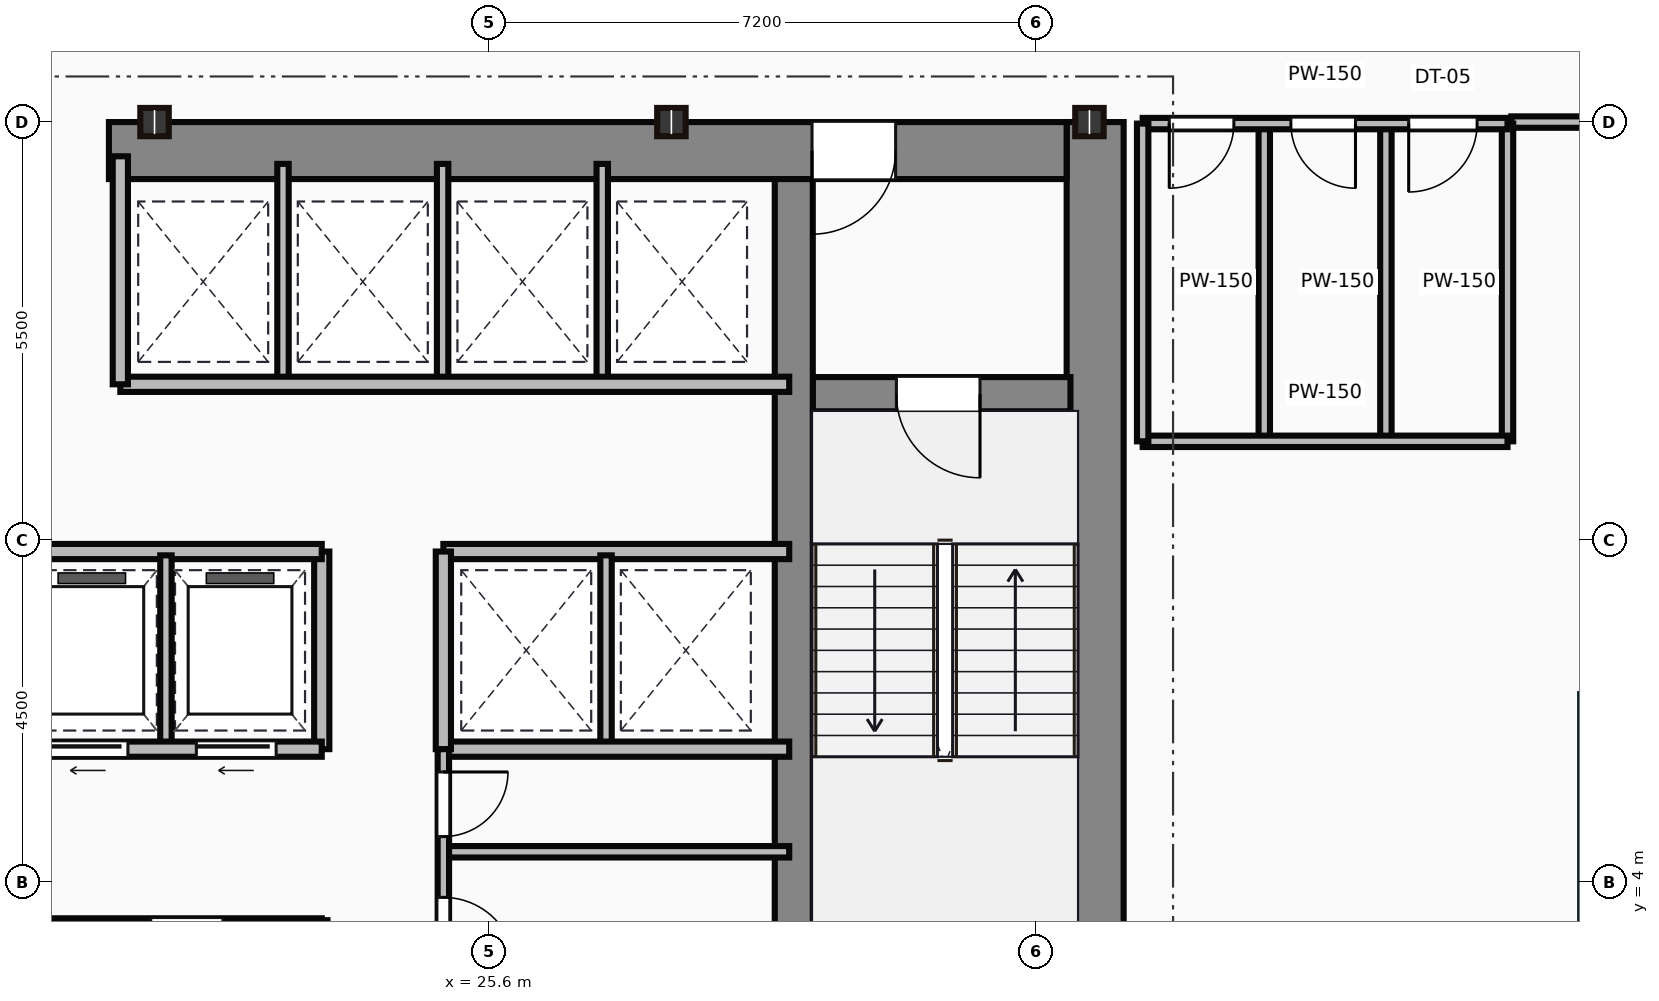
"""IFC4 building model, lengths in metres.
Left out: names, types, materials, properties, quantities, classifications, styles, units other than length and angle.
Written with IfcOpenShell. Run it as: python <this file> out.ifc"""

import sys

from ifc_helpers import new_model, si_unit, direction, frame, frame_2d, origin, origin_2d, place, context, subcontext, project, spatial, rectangle, i_section, extrude, source, transform, mapped, element, fill, save


model = new_model("IFC4")
c1 = context("Model", 3, precision=1e-05, world=origin(), true_north=direction((0.0, 1.0)))
c2 = subcontext(c1, "Body", "Model", "MODEL_VIEW")
j1 = project(units=[si_unit("LENGTHUNIT", "METRE"), si_unit("PLANEANGLEUNIT", "RADIAN")], contexts=[c1])
p1 = place(None, origin())
s1 = spatial("IfcSite", under=j1, at=p1, CompositionType="ELEMENT")
p2 = place(p1, origin())
s2 = spatial("IfcBuilding", under=s1, at=p2, CompositionType="ELEMENT")
p3 = place(p2, frame((0.0, 0.0, 155.2)))
s3 = spatial("IfcBuildingStorey", under=s2, at=p3, CompositionType="ELEMENT", Elevation=155.2)
m1 = source(origin(), c2, "Body", "SweptSolid", [
    extrude(rectangle(XDim=13.1, YDim=0.75, at=frame_2d((6.55, 0.0))), origin(), (0.0, 0.0, 1.0), 3.65),
])
p4 = place(p3, frame((33.575, 0.9, 0.0), z_axis=(0.0, 0.0, 1.0), x_axis=(0.0, 1.0, 0.0)))
e1 = element("IfcWall", 1, at=p4, inside=s3, PredefinedType="SHEAR", context=c2, shape_type="MappedRepresentation", body=[
    mapped(m1, transform((0.0, 0.0, 0.0))),
])
m2 = source(origin(), c2, "Body", "SweptSolid", [
    extrude(rectangle(XDim=12.6, YDim=0.75, at=frame_2d((6.3, 0.0))), origin(), (0.0, 0.0, 1.0), 3.65),
])
p5 = place(p3, frame((20.6, 13.625, 0.0), z_axis=(0.0, 0.0, 1.0), x_axis=(1.0, 0.0, 0.0)))
e2 = element("IfcWall", 2, at=p5, inside=s3, PredefinedType="SHEAR", context=c2, shape_type="MappedRepresentation", body=[
    mapped(m2, transform((0.0, 0.0, 0.0))),
])
p6 = place(p5, frame((9.25, 0.0, 0.0)))
e3 = element("IfcOpeningElement", 3, at=p6, cuts=e2, PredefinedType="OPENING", context=c2, shape_type="SweptSolid", body=[
    extrude(rectangle(XDim=1.1, YDim=2.15, at=frame_2d((0.55, 1.075))), frame((0.0, 0.385, 0.0), z_axis=(0.0, -1.0, 0.0), x_axis=(1.0, 0.0, 0.0)), (0.0, 0.0, 1.0), 0.77),
])
m3 = source(origin(), c2, "Body", "SweptSolid", [
    extrude(rectangle(XDim=12.35, YDim=0.5, at=frame_2d((6.175, 0.0))), origin(), (0.0, 0.0, 1.0), 3.65),
])
p7 = place(p3, frame((29.61, 0.9, 0.0), z_axis=(0.0, 0.0, 1.0), x_axis=(0.0, 1.0, 0.0)))
e4 = element("IfcWall", 4, at=p7, inside=s3, PredefinedType="SHEAR", context=c2, shape_type="MappedRepresentation", body=[
    mapped(m3, transform((0.0, 0.0, 0.0))),
])
m4 = source(origin(), c2, "Body", "SweptSolid", [
    extrude(rectangle(XDim=3.39, YDim=0.45, at=frame_2d((1.695, 0.0))), origin(), (0.0, 0.0, 1.0), 3.65),
])
p8 = place(p3, frame((29.86, 10.42, 0.0), z_axis=(0.0, 0.0, 1.0), x_axis=(1.0, 0.0, 0.0)))
e5 = element("IfcWall", 5, at=p8, inside=s3, PredefinedType="SHEAR", context=c2, shape_type="MappedRepresentation", body=[
    mapped(m4, transform((0.0, 0.0, 0.0))),
])
p9 = place(p8, frame((1.1, 0.0, 0.0)))
e6 = element("IfcOpeningElement", 6, at=p9, cuts=e5, PredefinedType="OPENING", context=c2, shape_type="SweptSolid", body=[
    extrude(rectangle(XDim=1.1, YDim=2.15, at=frame_2d((0.55, 1.075))), frame((0.0, 0.235, 0.0), z_axis=(0.0, -1.0, 0.0), x_axis=(1.0, 0.0, 0.0)), (0.0, 0.0, 1.0), 0.47),
])
m5 = source(origin(), c2, "Body", "SweptSolid", [
    extrude(i_section(OverallWidth=0.374, OverallDepth=0.372, WebThickness=0.016, FlangeThickness=0.026, at=origin_2d()), origin(), (0.0, 0.0, 1.0), 3.65),
])
for number, where, z_axis, x_axis in (
    (7, (21.2, 14.0, 0.0), (0.0, 0.0, 1.0), (1.0, 0.0, 0.0)),
    (8, (28.0, 14.0, 0.0), (0.0, 0.0, 1.0), (1.0, 0.0, 0.0)),
    (9, (33.5, 14.0, 0.0), (0.0, 0.0, 1.0), (1.0, 0.0, 0.0)),
):
    element("IfcColumn", number, at=place(p3, frame(where, z_axis=z_axis, x_axis=x_axis)), inside=s3, PredefinedType="COLUMN", context=c2, shape_type="MappedRepresentation", body=[
        mapped(m5, transform((0.0, 0.0, 0.0))),
    ])
m6 = source(origin(), c2, "Body", "SweptSolid", [
    extrude(rectangle(XDim=10.35, YDim=0.15, at=frame_2d((5.175, 0.0))), origin(), (0.0, 0.0, 1.0), 3.4),
])
p10 = place(p3, frame((13.05, 3.45, 0.0), z_axis=(0.0, 0.0, 1.0), x_axis=(1.0, 0.0, 0.0)))
e10 = element("IfcWall", 10, at=p10, inside=s3, PredefinedType="PARTITIONING", context=c2, shape_type="MappedRepresentation", body=[
    mapped(m6, transform((0.0, 0.0, 0.0))),
])
p11 = place(p10, frame((3.8, 0.0, 0.0)))
e11 = element("IfcOpeningElement", 11, at=p11, cuts=e10, PredefinedType="OPENING", context=c2, shape_type="SweptSolid", body=[
    extrude(rectangle(XDim=0.95, YDim=2.15, at=frame_2d((0.475, 1.075))), frame((0.0, 0.085, 0.0), z_axis=(0.0, -1.0, 0.0), x_axis=(1.0, 0.0, 0.0)), (0.0, 0.0, 1.0), 0.17),
])
p12 = place(p10, frame((8.1, 0.0, 0.0)))
e12 = element("IfcOpeningElement", 12, at=p12, cuts=e10, PredefinedType="OPENING", context=c2, shape_type="SweptSolid", body=[
    extrude(rectangle(XDim=0.95, YDim=2.15, at=frame_2d((0.475, 1.075))), frame((0.0, 0.085, 0.0), z_axis=(0.0, -1.0, 0.0), x_axis=(1.0, 0.0, 0.0)), (0.0, 0.0, 1.0), 0.17),
])
m7 = source(origin(), c2, "Body", "SweptSolid", [
    extrude(rectangle(XDim=2.65, YDim=0.15, at=frame_2d((1.325, 0.0))), origin(), (0.0, 0.0, 1.0), 3.4),
])
p13 = place(p3, frame((23.4, 0.85, 0.0), z_axis=(0.0, 0.0, 1.0), x_axis=(0.0, 1.0, 0.0)))
e13 = element("IfcWall", 13, at=p13, inside=s3, PredefinedType="PARTITIONING", context=c2, shape_type="MappedRepresentation", body=[
    mapped(m7, transform((0.0, 0.0, 0.0))),
])
m8 = source(origin(), c2, "Body", "SweptSolid", [
    extrude(rectangle(XDim=11.85, YDim=0.2, at=frame_2d((5.925, 0.0))), origin(), (0.0, 0.0, 1.0), 3.4),
])
p14 = place(p3, frame((11.55, 5.75, 0.0), z_axis=(0.0, 0.0, 1.0), x_axis=(1.0, 0.0, 0.0)))
e14 = element("IfcWall", 14, at=p14, inside=s3, PredefinedType="PARTITIONING", context=c2, shape_type="MappedRepresentation", body=[
    mapped(m8, transform((0.0, 0.0, 0.0))),
])
p15 = place(p14, frame((0.45, 0.0, 0.0)))
e15 = element("IfcOpeningElement", 15, at=p15, cuts=e14, PredefinedType="OPENING", context=c2, shape_type="SweptSolid", body=[
    extrude(rectangle(XDim=1.05, YDim=2.15, at=frame_2d((0.525, 1.075))), frame((0.0, 0.11, 0.0), z_axis=(0.0, -1.0, 0.0), x_axis=(1.0, 0.0, 0.0)), (0.0, 0.0, 1.0), 0.22),
])
p16 = place(p14, frame((2.4, 0.0, 0.0)))
e16 = element("IfcOpeningElement", 16, at=p16, cuts=e14, PredefinedType="OPENING", context=c2, shape_type="SweptSolid", body=[
    extrude(rectangle(XDim=1.05, YDim=2.15, at=frame_2d((0.525, 1.075))), frame((0.0, 0.11, 0.0), z_axis=(0.0, -1.0, 0.0), x_axis=(1.0, 0.0, 0.0)), (0.0, 0.0, 1.0), 0.22),
])
p17 = place(p14, frame((4.35, 0.0, 0.0)))
e17 = element("IfcOpeningElement", 17, at=p17, cuts=e14, PredefinedType="OPENING", context=c2, shape_type="SweptSolid", body=[
    extrude(rectangle(XDim=1.05, YDim=2.15, at=frame_2d((0.525, 1.075))), frame((0.0, 0.11, 0.0), z_axis=(0.0, -1.0, 0.0), x_axis=(1.0, 0.0, 0.0)), (0.0, 0.0, 1.0), 0.22),
])
p18 = place(p14, frame((6.3, 0.0, 0.0)))
e18 = element("IfcOpeningElement", 18, at=p18, cuts=e14, PredefinedType="OPENING", context=c2, shape_type="SweptSolid", body=[
    extrude(rectangle(XDim=1.05, YDim=2.15, at=frame_2d((0.525, 1.075))), frame((0.0, 0.11, 0.0), z_axis=(0.0, -1.0, 0.0), x_axis=(1.0, 0.0, 0.0)), (0.0, 0.0, 1.0), 0.22),
])
p19 = place(p14, frame((8.25, 0.0, 0.0)))
e19 = element("IfcOpeningElement", 19, at=p19, cuts=e14, PredefinedType="OPENING", context=c2, shape_type="SweptSolid", body=[
    extrude(rectangle(XDim=1.05, YDim=2.15, at=frame_2d((0.525, 1.075))), frame((0.0, 0.11, 0.0), z_axis=(0.0, -1.0, 0.0), x_axis=(1.0, 0.0, 0.0)), (0.0, 0.0, 1.0), 0.22),
])
p20 = place(p14, frame((10.2, 0.0, 0.0)))
e20 = element("IfcOpeningElement", 20, at=p20, cuts=e14, PredefinedType="OPENING", context=c2, shape_type="SweptSolid", body=[
    extrude(rectangle(XDim=1.05, YDim=2.15, at=frame_2d((0.525, 1.075))), frame((0.0, 0.11, 0.0), z_axis=(0.0, -1.0, 0.0), x_axis=(1.0, 0.0, 0.0)), (0.0, 0.0, 1.0), 0.22),
])
p21 = place(p3, frame((11.55, 8.35, 0.0), z_axis=(0.0, 0.0, 1.0), x_axis=(1.0, 0.0, 0.0)))
e21 = element("IfcWall", 21, at=p21, inside=s3, PredefinedType="PARTITIONING", context=c2, shape_type="MappedRepresentation", body=[
    mapped(m8, transform((0.0, 0.0, 0.0))),
])
m9 = source(origin(), c2, "Body", "SweptSolid", [
    extrude(rectangle(XDim=2.6, YDim=0.2, at=frame_2d((1.3, 0.0))), origin(), (0.0, 0.0, 1.0), 3.4),
])
p22 = place(p3, frame((23.4, 5.75, 0.0), z_axis=(0.0, 0.0, 1.0), x_axis=(0.0, 1.0, 0.0)))
e22 = element("IfcWall", 22, at=p22, inside=s3, PredefinedType="PARTITIONING", context=c2, shape_type="MappedRepresentation", body=[
    mapped(m9, transform((0.0, 0.0, 0.0))),
])
m10 = source(origin(), c2, "Body", "SweptSolid", [
    extrude(rectangle(XDim=2.5, YDim=0.15, at=frame_2d((1.25, 0.0))), origin(), (0.0, 0.0, 1.0), 3.4),
])
p23 = place(p3, frame((21.35, 5.8, 0.0), z_axis=(0.0, 0.0, 1.0), x_axis=(0.0, 1.0, 0.0)))
e23 = element("IfcWall", 23, at=p23, inside=s3, PredefinedType="PARTITIONING", context=c2, shape_type="MappedRepresentation", body=[
    mapped(m10, transform((0.0, 0.0, 0.0))),
])
m11 = source(origin(), c2, "Body", "SweptSolid", [
    extrude(rectangle(XDim=8.8, YDim=0.2, at=frame_2d((4.4, 0.0))), origin(), (0.0, 0.0, 1.0), 3.4),
])
p24 = place(p3, frame((20.75, 10.55, 0.0), z_axis=(0.0, 0.0, 1.0), x_axis=(1.0, 0.0, 0.0)))
e24 = element("IfcWall", 24, at=p24, inside=s3, PredefinedType="PARTITIONING", context=c2, shape_type="MappedRepresentation", body=[
    mapped(m11, transform((0.0, 0.0, 0.0))),
])
m12 = source(origin(), c2, "Body", "SweptSolid", [
    extrude(rectangle(XDim=3.0, YDim=0.2, at=frame_2d((1.5, 0.0))), origin(), (0.0, 0.0, 1.0), 3.4),
])
p25 = place(p3, frame((20.75, 10.55, 0.0), z_axis=(0.0, 0.0, 1.0), x_axis=(0.0, 1.0, 0.0)))
e25 = element("IfcWall", 25, at=p25, inside=s3, PredefinedType="PARTITIONING", context=c2, shape_type="MappedRepresentation", body=[
    mapped(m12, transform((0.0, 0.0, 0.0))),
])
m13 = source(origin(), c2, "Body", "SweptSolid", [
    extrude(rectangle(XDim=2.85, YDim=0.15, at=frame_2d((1.425, 0.0))), origin(), (0.0, 0.0, 1.0), 3.4),
])
for number, where, z_axis, x_axis in (
    (26, (22.89, 10.6, 0.0), (0.0, 0.0, 1.0), (0.0, 1.0, 0.0)),
    (27, (24.99, 10.6, 0.0), (0.0, 0.0, 1.0), (0.0, 1.0, 0.0)),
    (28, (27.09, 10.6, 0.0), (0.0, 0.0, 1.0), (0.0, 1.0, 0.0)),
):
    element("IfcWall", number, at=place(p3, frame(where, z_axis=z_axis, x_axis=x_axis)), inside=s3, PredefinedType="PARTITIONING", context=c2, shape_type="MappedRepresentation", body=[
        mapped(m13, transform((0.0, 0.0, 0.0))),
    ])
m14 = source(origin(), c2, "Body", "SweptSolid", [
    extrude(rectangle(XDim=4.55, YDim=0.2, at=frame_2d((2.275, 0.0))), origin(), (0.0, 0.0, 1.0), 3.4),
])
for number, where, z_axis, x_axis in (
    (29, (25.0, 8.35, 0.0), (0.0, 0.0, 1.0), (1.0, 0.0, 0.0)),
    (30, (25.0, 5.75, 0.0), (0.0, 0.0, 1.0), (1.0, 0.0, 0.0)),
):
    element("IfcWall", number, at=place(p3, frame(where, z_axis=z_axis, x_axis=x_axis)), inside=s3, PredefinedType="PARTITIONING", context=c2, shape_type="MappedRepresentation", body=[
        mapped(m14, transform((0.0, 0.0, 0.0))),
    ])
p26 = place(p3, frame((25.0, 5.75, 0.0), z_axis=(0.0, 0.0, 1.0), x_axis=(0.0, 1.0, 0.0)))
e31 = element("IfcWall", 31, at=p26, inside=s3, PredefinedType="PARTITIONING", context=c2, shape_type="MappedRepresentation", body=[
    mapped(m9, transform((0.0, 0.0, 0.0))),
])
p27 = place(p3, frame((27.14, 5.8, 0.0), z_axis=(0.0, 0.0, 1.0), x_axis=(0.0, 1.0, 0.0)))
e32 = element("IfcWall", 32, at=p27, inside=s3, PredefinedType="PARTITIONING", context=c2, shape_type="MappedRepresentation", body=[
    mapped(m10, transform((0.0, 0.0, 0.0))),
])
m15 = source(origin(), c2, "Body", "SweptSolid", [
    extrude(rectangle(XDim=4.9, YDim=0.15, at=frame_2d((2.45, 0.0))), origin(), (0.0, 0.0, 1.0), 3.4),
])
p28 = place(p3, frame((25.0, 0.85, 0.0), z_axis=(0.0, 0.0, 1.0), x_axis=(0.0, 1.0, 0.0)))
e33 = element("IfcWall", 33, at=p28, inside=s3, PredefinedType="PARTITIONING", context=c2, shape_type="MappedRepresentation", body=[
    mapped(m15, transform((0.0, 0.0, 0.0))),
])
p29 = place(p28, frame((2.0, 0.0, 0.0)))
e34 = element("IfcOpeningElement", 34, at=p29, cuts=e33, PredefinedType="OPENING", context=c2, shape_type="SweptSolid", body=[
    extrude(rectangle(XDim=0.95, YDim=2.15, at=frame_2d((0.475, 1.075))), frame((0.0, 0.085, 0.0), z_axis=(0.0, -1.0, 0.0), x_axis=(1.0, 0.0, 0.0)), (0.0, 0.0, 1.0), 0.17),
])
p30 = place(p28, frame((3.75, 0.0, 0.0)))
e35 = element("IfcOpeningElement", 35, at=p30, cuts=e33, PredefinedType="OPENING", context=c2, shape_type="SweptSolid", body=[
    extrude(rectangle(XDim=0.85, YDim=2.15, at=frame_2d((0.425, 1.075))), frame((0.0, 0.085, 0.0), z_axis=(0.0, -1.0, 0.0), x_axis=(1.0, 0.0, 0.0)), (0.0, 0.0, 1.0), 0.17),
])
m16 = source(origin(), c2, "Body", "SweptSolid", [
    extrude(rectangle(XDim=4.55, YDim=0.15, at=frame_2d((2.275, 0.0))), origin(), (0.0, 0.0, 1.0), 3.4),
])
p31 = place(p3, frame((25.0, 4.4, 0.0), z_axis=(0.0, 0.0, 1.0), x_axis=(1.0, 0.0, 0.0)))
e36 = element("IfcWall", 36, at=p31, inside=s3, PredefinedType="PARTITIONING", context=c2, shape_type="MappedRepresentation", body=[
    mapped(m16, transform((0.0, 0.0, 0.0))),
])
m17 = source(origin(), c2, "Body", "SweptSolid", [
    extrude(rectangle(XDim=4.8, YDim=0.15, at=frame_2d((2.4, 0.0))), origin(), (0.0, 0.0, 1.0), 2.76),
])
p32 = place(p3, frame((34.2, 13.98, 0.0), z_axis=(0.0, 0.0, 1.0), x_axis=(1.0, 0.0, 0.0)))
e37 = element("IfcWall", 37, at=p32, inside=s3, PredefinedType="PARTITIONING", context=c2, shape_type="MappedRepresentation", body=[
    mapped(m17, transform((0.0, 0.0, 0.0))),
])
p33 = place(p32, frame((0.35, 0.0, 0.0)))
e38 = element("IfcOpeningElement", 38, at=p33, cuts=e37, PredefinedType="OPENING", context=c2, shape_type="SweptSolid", body=[
    extrude(rectangle(XDim=0.85, YDim=2.1, at=frame_2d((0.425, 1.05))), frame((0.0, 0.085, 0.0), z_axis=(0.0, -1.0, 0.0), x_axis=(1.0, 0.0, 0.0)), (0.0, 0.0, 1.0), 0.17),
])
p34 = place(p32, frame((1.95, 0.0, 0.0)))
e39 = element("IfcOpeningElement", 39, at=p34, cuts=e37, PredefinedType="OPENING", context=c2, shape_type="SweptSolid", body=[
    extrude(rectangle(XDim=0.85, YDim=2.1, at=frame_2d((0.425, 1.05))), frame((0.0, 0.085, 0.0), z_axis=(0.0, -1.0, 0.0), x_axis=(1.0, 0.0, 0.0)), (0.0, 0.0, 1.0), 0.17),
])
p35 = place(p32, frame((3.5, 0.0, 0.0)))
e40 = element("IfcOpeningElement", 40, at=p35, cuts=e37, PredefinedType="OPENING", context=c2, shape_type="SweptSolid", body=[
    extrude(rectangle(XDim=0.9, YDim=2.1, at=frame_2d((0.45, 1.05))), frame((0.0, 0.085, 0.0), z_axis=(0.0, -1.0, 0.0), x_axis=(1.0, 0.0, 0.0)), (0.0, 0.0, 1.0), 0.17),
])
m18 = source(origin(), c2, "Body", "SweptSolid", [
    extrude(rectangle(XDim=4.8, YDim=0.15, at=frame_2d((2.4, 0.0))), origin(), (0.0, 0.0, 1.0), 3.4),
])
p36 = place(p3, frame((34.2, 9.8, 0.0), z_axis=(0.0, 0.0, 1.0), x_axis=(1.0, 0.0, 0.0)))
e41 = element("IfcWall", 41, at=p36, inside=s3, PredefinedType="PARTITIONING", context=c2, shape_type="MappedRepresentation", body=[
    mapped(m18, transform((0.0, 0.0, 0.0))),
])
m19 = source(origin(), c2, "Body", "SweptSolid", [
    extrude(rectangle(XDim=4.18, YDim=0.15, at=frame_2d((2.09, 0.0))), origin(), (0.0, 0.0, 1.0), 3.4),
])
for number, where, z_axis, x_axis in (
    (42, (39.0, 9.8, 0.0), (0.0, 0.0, 1.0), (0.0, 1.0, 0.0)),
    (43, (34.2, 9.8, 0.0), (0.0, 0.0, 1.0), (0.0, 1.0, 0.0)),
    (44, (35.8, 9.8, 0.0), (0.0, 0.0, 1.0), (0.0, 1.0, 0.0)),
    (45, (37.4, 9.8, 0.0), (0.0, 0.0, 1.0), (0.0, 1.0, 0.0)),
):
    element("IfcWall", number, at=place(p3, frame(where, z_axis=z_axis, x_axis=x_axis)), inside=s3, PredefinedType="PARTITIONING", context=c2, shape_type="MappedRepresentation", body=[
        mapped(m19, transform((0.0, 0.0, 0.0))),
    ])
m20 = source(origin(), c2, "Body", "SweptSolid", [
    extrude(rectangle(XDim=1.75, YDim=0.15, at=frame_2d((0.875, 0.0))), origin(), (0.0, 0.0, 1.0), 2.76),
])
p37 = place(p3, frame((40.8, 14.0, 0.0), z_axis=(0.0, 0.0, 1.0), x_axis=(-1.0, 0.0, 0.0)))
e46 = element("IfcWall", 46, at=p37, inside=s3, PredefinedType="PARTITIONING", context=c2, shape_type="MappedRepresentation", body=[
    mapped(m20, transform((0.0, 0.0, 0.0))),
])
m21 = source(origin(), c2, "Body", "SweptSolid", [
    extrude(rectangle(XDim=1.1, YDim=2.15, at=frame_2d((0.55, 1.075))), frame((0.0, 0.025, 0.0), z_axis=(0.0, -1.0, 0.0), x_axis=(1.0, 0.0, 0.0)), (0.0, 0.0, 1.0), 0.05),
])
p38 = place(p9, frame((1.1, 0.0, 0.0), z_axis=(0.0, 0.0, 1.0), x_axis=(-1.0, 0.0, 0.0)))
e47 = element("IfcDoor", 47, at=p38, inside=s3, OperationType="SINGLE_SWING_RIGHT", PredefinedType="DOOR", context=c2, shape_type="MappedRepresentation", body=[
    mapped(m21, transform((0.0, 0.0, 0.0))),
])
fill(e6, e47)
p39 = place(p6, origin())
e48 = element("IfcDoor", 48, at=p39, inside=s3, OperationType="SINGLE_SWING_LEFT", PredefinedType="DOOR", context=c2, shape_type="MappedRepresentation", body=[
    mapped(m21, transform((0.0, 0.0, 0.0))),
])
fill(e3, e48)
m22 = source(origin(), c2, "Body", "SweptSolid", [
    extrude(rectangle(XDim=1.05, YDim=2.15, at=frame_2d((0.525, 1.075))), frame((0.0, 0.025, 0.0), z_axis=(0.0, -1.0, 0.0), x_axis=(1.0, 0.0, 0.0)), (0.0, 0.0, 1.0), 0.05),
])
p40 = place(p19, frame((1.05, 0.0, 0.0), z_axis=(0.0, 0.0, 1.0), x_axis=(-1.0, 0.0, 0.0)))
e49 = element("IfcDoor", 49, at=p40, inside=s3, OperationType="SLIDING_TO_LEFT", PredefinedType="DOOR", context=c2, shape_type="MappedRepresentation", body=[
    mapped(m22, transform((0.0, 0.0, 0.0))),
])
fill(e19, e49)
p41 = place(p20, frame((1.05, 0.0, 0.0), z_axis=(0.0, 0.0, 1.0), x_axis=(-1.0, 0.0, 0.0)))
e50 = element("IfcDoor", 50, at=p41, inside=s3, OperationType="SLIDING_TO_LEFT", PredefinedType="DOOR", context=c2, shape_type="MappedRepresentation", body=[
    mapped(m22, transform((0.0, 0.0, 0.0))),
])
fill(e20, e50)
m23 = source(origin(), c2, "Body", "SweptSolid", [
    extrude(rectangle(XDim=0.95, YDim=2.15, at=frame_2d((0.475, 1.075))), frame((0.0, 0.025, 0.0), z_axis=(0.0, -1.0, 0.0), x_axis=(1.0, 0.0, 0.0)), (0.0, 0.0, 1.0), 0.05),
])
p42 = place(p29, origin())
e51 = element("IfcDoor", 51, at=p42, inside=s3, OperationType="SINGLE_SWING_LEFT", PredefinedType="DOOR", context=c2, shape_type="MappedRepresentation", body=[
    mapped(m23, transform((0.0, 0.0, 0.0))),
])
fill(e34, e51)
m24 = source(origin(), c2, "Body", "SweptSolid", [
    extrude(rectangle(XDim=0.85, YDim=2.15, at=frame_2d((0.425, 1.075))), frame((0.0, 0.025, 0.0), z_axis=(0.0, -1.0, 0.0), x_axis=(1.0, 0.0, 0.0)), (0.0, 0.0, 1.0), 0.05),
])
p43 = place(p30, origin())
e52 = element("IfcDoor", 52, at=p43, inside=s3, OperationType="SINGLE_SWING_RIGHT", PredefinedType="DOOR", context=c2, shape_type="MappedRepresentation", body=[
    mapped(m24, transform((0.0, 0.0, 0.0))),
])
fill(e35, e52)
m25 = source(origin(), c2, "Body", "SweptSolid", [
    extrude(rectangle(XDim=0.85, YDim=2.1, at=frame_2d((0.425, 1.05))), frame((0.0, 0.025, 0.0), z_axis=(0.0, -1.0, 0.0), x_axis=(1.0, 0.0, 0.0)), (0.0, 0.0, 1.0), 0.05),
])
p44 = place(p33, frame((0.85, 0.0, 0.0), z_axis=(0.0, 0.0, 1.0), x_axis=(-1.0, 0.0, 0.0)))
e53 = element("IfcDoor", 53, at=p44, inside=s3, OperationType="SINGLE_SWING_LEFT", PredefinedType="DOOR", context=c2, shape_type="MappedRepresentation", body=[
    mapped(m25, transform((0.0, 0.0, 0.0))),
])
fill(e38, e53)
p45 = place(p34, frame((0.85, 0.0, 0.0), z_axis=(0.0, 0.0, 1.0), x_axis=(-1.0, 0.0, 0.0)))
e54 = element("IfcDoor", 54, at=p45, inside=s3, OperationType="SINGLE_SWING_RIGHT", PredefinedType="DOOR", context=c2, shape_type="MappedRepresentation", body=[
    mapped(m25, transform((0.0, 0.0, 0.0))),
])
fill(e39, e54)
m26 = source(origin(), c2, "Body", "SweptSolid", [
    extrude(rectangle(XDim=0.9, YDim=2.1, at=frame_2d((0.45, 1.05))), frame((0.0, 0.025, 0.0), z_axis=(0.0, -1.0, 0.0), x_axis=(1.0, 0.0, 0.0)), (0.0, 0.0, 1.0), 0.05),
])
p46 = place(p35, frame((0.9, 0.0, 0.0), z_axis=(0.0, 0.0, 1.0), x_axis=(-1.0, 0.0, 0.0)))
e55 = element("IfcDoor", 55, at=p46, inside=s3, OperationType="SINGLE_SWING_LEFT", PredefinedType="DOOR", context=c2, shape_type="MappedRepresentation", body=[
    mapped(m26, transform((0.0, 0.0, 0.0))),
])
fill(e40, e55)
save(model, sys.argv[1])
